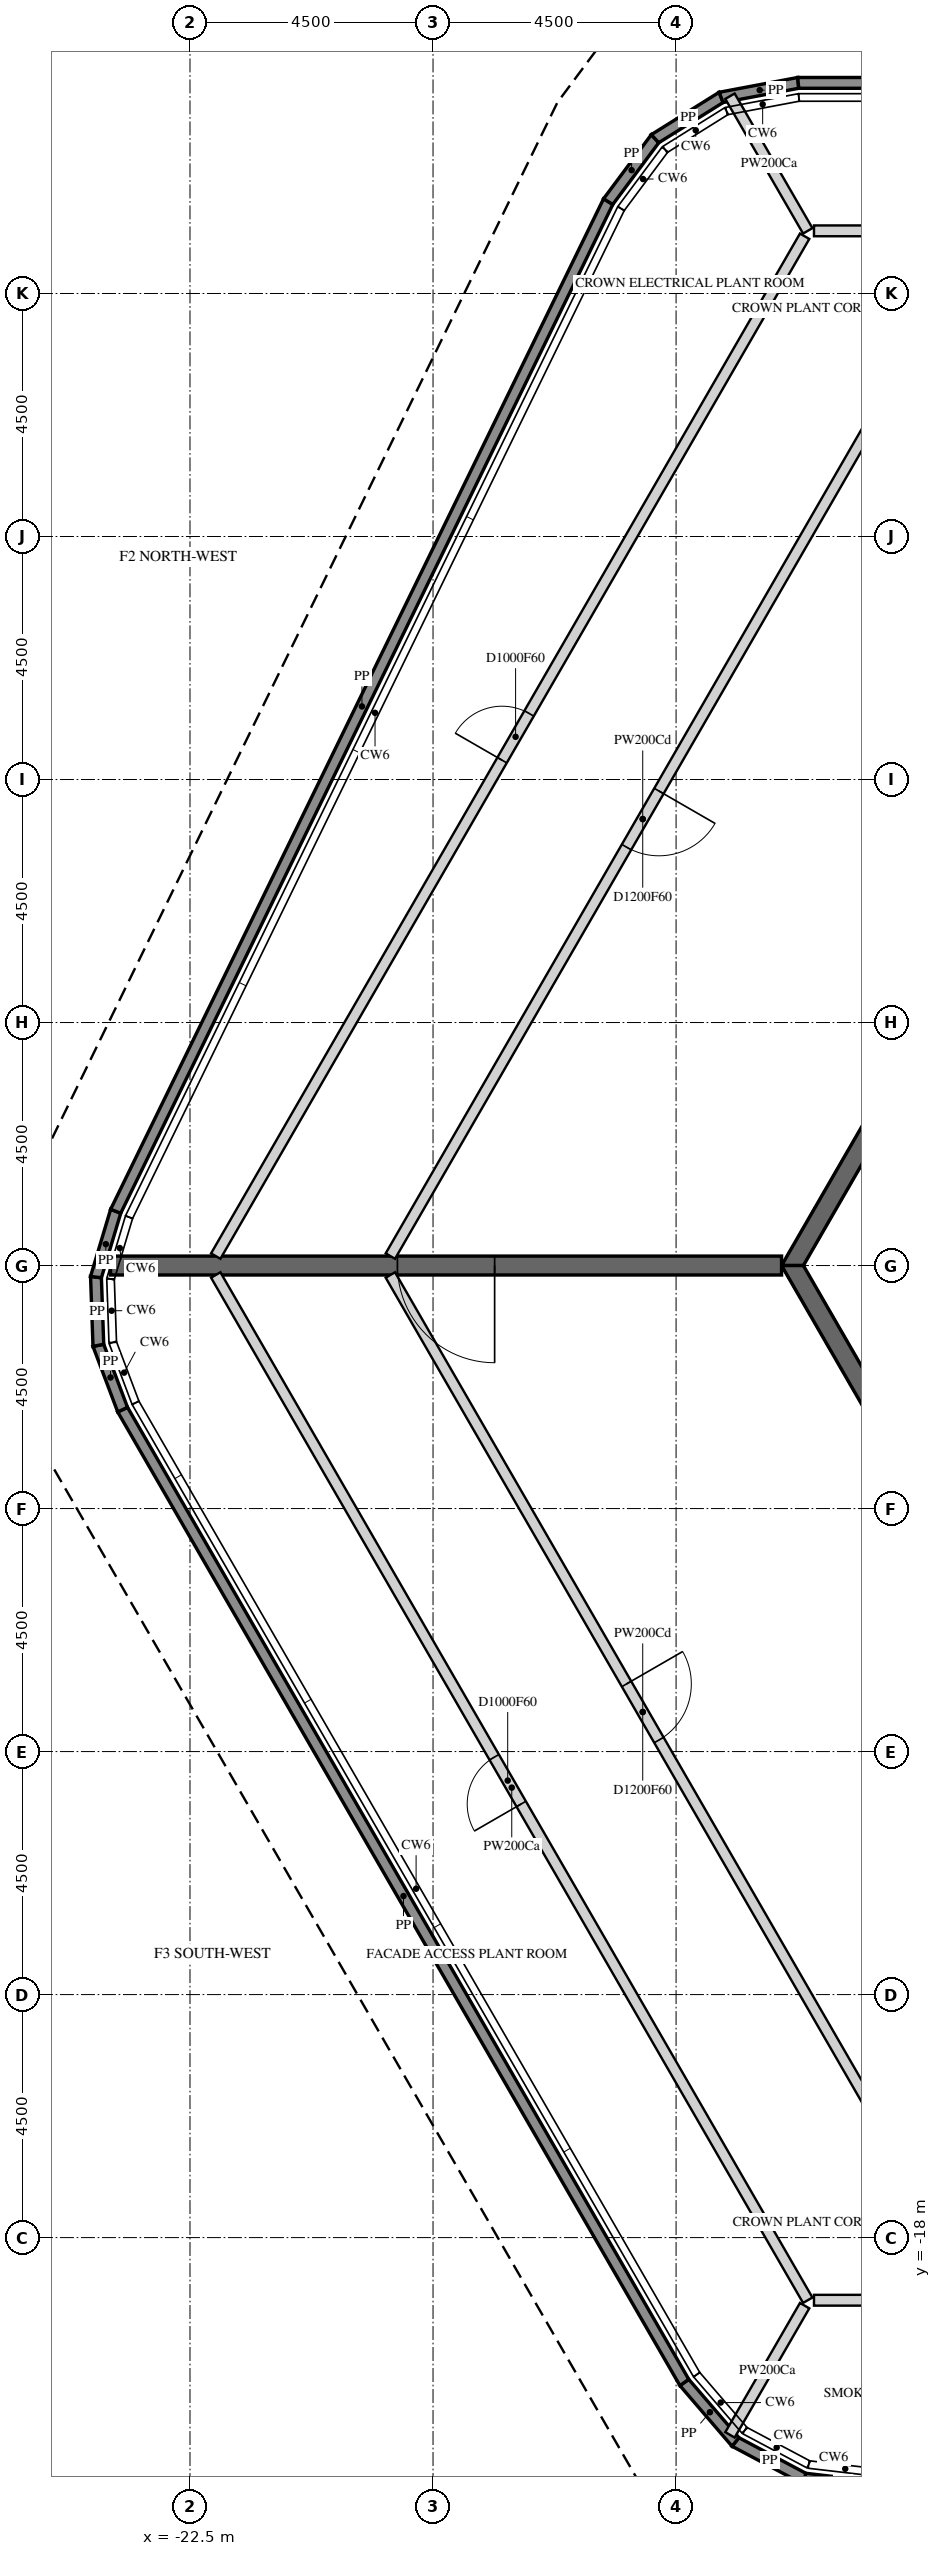
"""IFC4 building model, lengths in metres.
Left out: names, types, materials, properties, quantities, classifications, styles, units other than length and angle.
Written with IfcOpenShell. Run it as: python <this file> out.ifc"""

import sys

from ifc_helpers import new_model, si_unit, direction, frame, frame_2d, origin, place, context, subcontext, project, spatial, polyline, rectangle, outline, extrude, element, fill, save


model = new_model("IFC4")
c1 = context("Model", 3, precision=1e-05, world=origin(), true_north=direction((0.0, 1.0)))
c2 = subcontext(c1, "Body", "Model", "MODEL_VIEW")
j1 = project(units=[si_unit("LENGTHUNIT", "METRE"), si_unit("PLANEANGLEUNIT", "RADIAN")], contexts=[c1])
p1 = place(None, origin())
s1 = spatial("IfcSite", under=j1, at=p1, CompositionType="ELEMENT")
p2 = place(p1, origin())
s2 = spatial("IfcBuilding", under=s1, at=p2, CompositionType="ELEMENT")
p3 = place(p2, frame((0.0, 0.0, 388.2)))
s3 = spatial("IfcBuildingStorey", under=s2, at=p3, CompositionType="ELEMENT", Elevation=388.2)
p4 = place(p3, frame((-9.683, -22.631, 4.5), z_axis=(0.0, 0.0, 1.0), x_axis=(-0.993231825369, 0.116148788514, 0.0)))
e1 = element("IfcWall", 1, at=p4, inside=s3, PredefinedType="PARAPET", context=c2, shape_type="SweptSolid", body=[
    extrude(outline(polyline([(0.009, -0.1), (1.434, -0.1), (1.471, 0.1), (-0.009, 0.1), (0.009, -0.1)])), origin(), (0.0, 0.0, 1.0), 1.1),
])
p5 = place(p3, frame((-11.126, -22.462, 4.5), z_axis=(0.0, 0.0, 1.0), x_axis=(-0.882946998442, 0.46947268072, 0.0)))
e2 = element("IfcWall", 2, at=p5, inside=s3, PredefinedType="PARAPET", context=c2, shape_type="SweptSolid", body=[
    extrude(outline(polyline([(0.019, -0.1), (1.424, -0.1), (1.462, 0.1), (-0.019, 0.1), (0.019, -0.1)])), origin(), (0.0, 0.0, 1.0), 1.1),
])
p6 = place(p3, frame((-12.4, -21.784, 4.5), z_axis=(0.0, 0.0, 1.0), x_axis=(-0.651635311812, 0.758532412228, 0.0)))
e3 = element("IfcWall", 3, at=p6, inside=s3, PredefinedType="PARAPET", context=c2, shape_type="SweptSolid", body=[
    extrude(outline(polyline([(0.019, -0.1), (1.443, -0.1), (1.462, 0.1), (-0.019, 0.1), (0.019, -0.1)])), origin(), (0.0, 0.0, 1.0), 1.1),
])
p7 = place(p3, frame((-13.347, -20.683, 4.5), z_axis=(0.0, 0.0, 1.0), x_axis=(-0.500005572435, 0.866022186514, 0.0)))
e4 = element("IfcWall", 4, at=p7, inside=s3, PredefinedType="PARAPET", context=c2, shape_type="SweptSolid", body=[
    extrude(outline(polyline([(0.009, -0.1), (20.793, -0.1), (20.809, 0.1), (-0.009, 0.1), (0.009, -0.1)])), origin(), (0.0, 0.0, 1.0), 1.1),
])
p8 = place(p3, frame((-23.747, -2.668, 4.5), z_axis=(0.0, 0.0, 1.0), x_axis=(-0.352930531417, 0.935649528399, 0.0)))
e5 = element("IfcWall", 5, at=p8, inside=s3, PredefinedType="PARAPET", context=c2, shape_type="SweptSolid", body=[
    extrude(outline(polyline([(0.008, -0.1), (1.256, -0.1), (1.289, 0.1), (-0.008, 0.1), (0.008, -0.1)])), origin(), (0.0, 0.0, 1.0), 1.1),
])
p9 = place(p3, frame((-24.197, -1.478, 4.5), z_axis=(0.0, 0.0, 1.0), x_axis=(-0.034947726938, 0.999389141617, 0.0)))
e6 = element("IfcWall", 6, at=p9, inside=s3, PredefinedType="PARAPET", context=c2, shape_type="SweptSolid", body=[
    extrude(outline(polyline([(0.016, -0.1), (1.248, -0.1), (1.281, 0.1), (-0.016, 0.1), (0.016, -0.1)])), origin(), (0.0, 0.0, 1.0), 1.1),
])
p10 = place(p3, frame((-24.241, -0.214, 4.5), z_axis=(0.0, 0.0, 1.0), x_axis=(0.286907985053, 0.957958145282, 0.0)))
e7 = element("IfcWall", 7, at=p10, inside=s3, PredefinedType="PARAPET", context=c2, shape_type="SweptSolid", body=[
    extrude(outline(polyline([(0.016, -0.1), (1.265, -0.1), (1.281, 0.1), (-0.016, 0.1), (0.016, -0.1)])), origin(), (0.0, 0.0, 1.0), 1.1),
])
p11 = place(p3, frame((-23.875, 1.006, 4.5), z_axis=(0.0, 0.0, 1.0), x_axis=(0.43837021347, 0.898794501509, 0.0)))
e8 = element("IfcWall", 8, at=p11, inside=s3, PredefinedType="PARAPET", context=c2, shape_type="SweptSolid", body=[
    extrude(outline(polyline([(0.008, -0.1), (20.792, -0.1), (20.81, 0.1), (-0.008, 0.1), (0.008, -0.1)])), origin(), (0.0, 0.0, 1.0), 1.1),
])
p12 = place(p3, frame((-14.757, 19.701, 4.5), z_axis=(0.0, 0.0, 1.0), x_axis=(0.597118923952, 0.802152722777, 0.0)))
e9 = element("IfcWall", 9, at=p12, inside=s3, PredefinedType="PARAPET", context=c2, shape_type="SweptSolid", body=[
    extrude(outline(polyline([(0.009, -0.1), (1.434, -0.1), (1.471, 0.1), (-0.009, 0.1), (0.009, -0.1)])), origin(), (0.0, 0.0, 1.0), 1.1),
])
p13 = place(p3, frame((-13.89, 20.866, 4.5), z_axis=(0.0, 0.0, 1.0), x_axis=(0.848083831846, 0.529862070884, 0.0)))
e10 = element("IfcWall", 10, at=p13, inside=s3, PredefinedType="PARAPET", context=c2, shape_type="SweptSolid", body=[
    extrude(outline(polyline([(0.019, -0.1), (1.424, -0.1), (1.462, 0.1), (-0.019, 0.1), (0.019, -0.1)])), origin(), (0.0, 0.0, 1.0), 1.1),
])
p14 = place(p3, frame((-12.666, 21.631, 4.5), z_axis=(0.0, 0.0, 1.0), x_axis=(0.982729187844, 0.185049570005, 0.0)))
e11 = element("IfcWall", 11, at=p14, inside=s3, PredefinedType="PARAPET", context=c2, shape_type="SweptSolid", body=[
    extrude(outline(polyline([(0.019, -0.1), (1.443, -0.1), (1.462, 0.1), (-0.019, 0.1), (0.019, -0.1)])), origin(), (0.0, 0.0, 1.0), 1.1),
])
p15 = place(p3, frame((-11.238, 21.9, 4.5), z_axis=(0.0, 0.0, 1.0), x_axis=(1.0, 0.0, 0.0)))
e12 = element("IfcWall", 12, at=p15, inside=s3, PredefinedType="PARAPET", context=c2, shape_type="SweptSolid", body=[
    extrude(outline(polyline([(0.009, -0.1), (20.793, -0.1), (20.809, 0.1), (-0.009, 0.1), (0.009, -0.1)])), origin(), (0.0, 0.0, 1.0), 1.1),
])
p16 = place(p3, frame((-5.673, 9.825, -0.2), z_axis=(0.0, 0.0, 1.0), x_axis=(-0.499995046907, -0.866028263435, 0.0)))
e13 = element("IfcWall", 13, at=p16, inside=s3, PredefinedType="SHEAR", context=c2, shape_type="SweptSolid", body=[
    extrude(outline(polyline([(-0.101, -0.175), (11.446, -0.175), (11.244, 0.175), (0.101, 0.175), (-0.101, -0.175)])), origin(), (0.0, 0.0, 1.0), 4.5),
])
p17 = place(p16, frame((4.801, 0.0, 0.2)))
e14 = element("IfcOpeningElement", 14, at=p17, cuts=e13, PredefinedType="OPENING", context=c2, shape_type="SweptSolid", body=[
    extrude(rectangle(XDim=1.8, YDim=2.4, at=frame_2d((0.9, 1.2))), frame((0.0, 0.185, 0.0), z_axis=(0.0, -1.0, 0.0), x_axis=(1.0, 0.0, 0.0)), (0.0, 0.0, 1.0), 0.37),
])
p18 = place(p3, frame((-11.345, 0.0, -0.2), z_axis=(0.0, 0.0, 1.0), x_axis=(0.499995046907, -0.866028263435, 0.0)))
e15 = element("IfcWall", 15, at=p18, inside=s3, PredefinedType="SHEAR", context=c2, shape_type="SweptSolid", body=[
    extrude(outline(polyline([(-0.101, -0.175), (11.446, -0.175), (11.244, 0.175), (0.101, 0.175), (-0.101, -0.175)])), origin(), (0.0, 0.0, 1.0), 4.5),
])
p19 = place(p18, frame((4.744, 0.0, 0.2)))
e16 = element("IfcOpeningElement", 16, at=p19, cuts=e15, PredefinedType="OPENING", context=c2, shape_type="SweptSolid", body=[
    extrude(rectangle(XDim=1.8, YDim=2.4, at=frame_2d((0.9, 1.2))), frame((0.0, 0.185, 0.0), z_axis=(0.0, -1.0, 0.0), x_axis=(1.0, 0.0, 0.0)), (0.0, 0.0, 1.0), 0.37),
])
p20 = place(p3, frame((-11.547, 0.0, -0.2), z_axis=(0.0, 0.0, 1.0), x_axis=(-1.0, 0.0, 0.0)))
e17 = element("IfcWall", 17, at=p20, inside=s3, PredefinedType="SHEAR", context=c2, shape_type="SweptSolid", body=[
    extrude(rectangle(XDim=12.425, YDim=0.35, at=frame_2d((6.212, 0.0))), origin(), (0.0, 0.0, 1.0), 4.5),
])
p21 = place(p20, frame((5.312, 0.0, 0.2)))
e18 = element("IfcOpeningElement", 18, at=p21, cuts=e17, PredefinedType="OPENING", context=c2, shape_type="SweptSolid", body=[
    extrude(rectangle(XDim=1.8, YDim=2.4, at=frame_2d((0.9, 1.2))), frame((0.0, 0.185, 0.0), z_axis=(0.0, -1.0, 0.0), x_axis=(1.0, 0.0, 0.0)), (0.0, 0.0, 1.0), 0.37),
])
p22 = place(p3, frame((-11.062, -19.16, 0.0), z_axis=(0.0, 0.0, 1.0), x_axis=(-0.500000738101, 0.866024977641, 0.0)))
e19 = element("IfcWall", 19, at=p22, inside=s3, PredefinedType="PARTITIONING", context=c2, shape_type="SweptSolid", body=[
    extrude(rectangle(XDim=21.922, YDim=0.2, at=frame_2d((10.961, 0.0))), origin(), (0.0, 0.0, 1.0), 4.3),
])
p23 = place(p22, frame((10.611, 0.0, 0.0)))
e20 = element("IfcOpeningElement", 20, at=p23, cuts=e19, PredefinedType="OPENING", context=c2, shape_type="SweptSolid", body=[
    extrude(rectangle(XDim=1.0, YDim=2.1, at=frame_2d((0.5, 1.05))), frame((0.0, 0.11, 0.0), z_axis=(0.0, -1.0, 0.0), x_axis=(1.0, 0.0, 0.0)), (0.0, 0.0, 1.0), 0.22),
])
p24 = place(p3, frame((-18.79, -0.175, 0.0), z_axis=(0.0, 0.0, 1.0), x_axis=(0.500020978615, -0.866013291437, 0.0)))
e21 = element("IfcWall", 21, at=p24, inside=s3, PredefinedType="PARTITIONING", context=c2, shape_type="SweptSolid", body=[
    extrude(rectangle(XDim=18.689, YDim=0.2, at=frame_2d((9.345, 0.0))), origin(), (0.0, 0.0, 1.0), 3.692),
])
p25 = place(p24, frame((8.745, 0.0, 0.0)))
e22 = element("IfcOpeningElement", 22, at=p25, cuts=e21, PredefinedType="OPENING", context=c2, shape_type="SweptSolid", body=[
    extrude(rectangle(XDim=1.2, YDim=2.1, at=frame_2d((0.6, 1.05))), frame((0.0, 0.11, 0.0), z_axis=(0.0, -1.0, 0.0), x_axis=(1.0, 0.0, 0.0)), (0.0, 0.0, 1.0), 0.22),
])
p26 = place(p3, frame((-12.502, -21.653, 0.0), z_axis=(0.0, 0.0, 1.0), x_axis=(0.500186343266, 0.865917791716, 0.0)))
e23 = element("IfcWall", 23, at=p26, inside=s3, PredefinedType="PARTITIONING", context=c2, shape_type="SweptSolid", body=[
    extrude(rectangle(XDim=2.764, YDim=0.2, at=frame_2d((1.382, 0.0))), origin(), (0.0, 0.0, 1.0), 4.3),
])
p27 = place(p3, frame((-12.502, 21.653, 0.0), z_axis=(0.0, 0.0, 1.0), x_axis=(0.500133489192, -0.865948320045, 0.0)))
e24 = element("IfcWall", 24, at=p27, inside=s3, PredefinedType="PARTITIONING", context=c2, shape_type="SweptSolid", body=[
    extrude(rectangle(XDim=2.879, YDim=0.2, at=frame_2d((1.439, 0.0))), origin(), (0.0, 0.0, 1.0), 4.3),
])
p28 = place(p3, frame((10.86, -19.16, 0.0), z_axis=(0.0, 0.0, 1.0), x_axis=(-1.0, 0.0, 0.0)))
e25 = element("IfcWall", 25, at=p28, inside=s3, PredefinedType="PARTITIONING", context=c2, shape_type="SweptSolid", body=[
    extrude(rectangle(XDim=21.807, YDim=0.2, at=frame_2d((10.903, 0.0))), origin(), (0.0, 0.0, 1.0), 4.3),
])
p29 = place(p28, frame((10.603, 0.0, 0.0)))
e26 = element("IfcOpeningElement", 26, at=p29, cuts=e25, PredefinedType="OPENING", context=c2, shape_type="SweptSolid", body=[
    extrude(rectangle(XDim=1.0, YDim=2.1, at=frame_2d((0.5, 1.05))), frame((0.0, 0.11, 0.0), z_axis=(0.0, -1.0, 0.0), x_axis=(1.0, 0.0, 0.0)), (0.0, 0.0, 1.0), 0.22),
])
p30 = place(p3, frame((-22.023, 0.175, 0.0), z_axis=(0.0, 0.0, 1.0), x_axis=(0.500001886152, 0.866024314812, 0.0)))
e27 = element("IfcWall", 27, at=p30, inside=s3, PredefinedType="PARTITIONING", context=c2, shape_type="SweptSolid", body=[
    extrude(rectangle(XDim=21.807, YDim=0.2, at=frame_2d((10.903, 0.0))), origin(), (0.0, 0.0, 1.0), 4.3),
])
p31 = place(p30, frame((10.603, 0.0, 0.0)))
e28 = element("IfcOpeningElement", 28, at=p31, cuts=e27, PredefinedType="OPENING", context=c2, shape_type="SweptSolid", body=[
    extrude(rectangle(XDim=1.0, YDim=2.1, at=frame_2d((0.5, 1.05))), frame((0.0, 0.11, 0.0), z_axis=(0.0, -1.0, 0.0), x_axis=(1.0, 0.0, 0.0)), (0.0, 0.0, 1.0), 0.22),
])
p32 = place(p3, frame((-9.445, 16.36, 0.0), z_axis=(0.0, 0.0, 1.0), x_axis=(-0.500020978615, -0.866013291437, 0.0)))
e29 = element("IfcWall", 29, at=p32, inside=s3, PredefinedType="PARTITIONING", context=c2, shape_type="SweptSolid", body=[
    extrude(rectangle(XDim=18.689, YDim=0.2, at=frame_2d((9.345, 0.0))), origin(), (0.0, 0.0, 1.0), 3.692),
])
p33 = place(p32, frame((8.745, 0.0, 0.0)))
e30 = element("IfcOpeningElement", 30, at=p33, cuts=e29, PredefinedType="OPENING", context=c2, shape_type="SweptSolid", body=[
    extrude(rectangle(XDim=1.2, YDim=2.1, at=frame_2d((0.6, 1.05))), frame((0.0, 0.11, 0.0), z_axis=(0.0, -1.0, 0.0), x_axis=(1.0, 0.0, 0.0)), (0.0, 0.0, 1.0), 0.22),
])
p34 = place(p3, frame((-10.947, 19.16, 0.0), z_axis=(0.0, 0.0, 1.0), x_axis=(1.0, 0.0, 0.0)))
e31 = element("IfcWall", 31, at=p34, inside=s3, PredefinedType="PARTITIONING", context=c2, shape_type="SweptSolid", body=[
    extrude(rectangle(XDim=21.807, YDim=0.2, at=frame_2d((10.903, 0.0))), origin(), (0.0, 0.0, 1.0), 4.3),
])
p35 = place(p34, frame((10.503, 0.0, 0.0)))
e32 = element("IfcOpeningElement", 32, at=p35, cuts=e31, PredefinedType="OPENING", context=c2, shape_type="SweptSolid", body=[
    extrude(rectangle(XDim=1.0, YDim=2.1, at=frame_2d((0.5, 1.05))), frame((0.0, 0.11, 0.0), z_axis=(0.0, -1.0, 0.0), x_axis=(1.0, 0.0, 0.0)), (0.0, 0.0, 1.0), 0.22),
])
p36 = place(p21, origin())
e33 = element("IfcDoor", 33, at=p36, inside=s3, OperationType="DOUBLE_DOOR_SINGLE_SWING", PredefinedType="DOOR", context=c2, shape_type="SweptSolid", body=[
    extrude(rectangle(XDim=1.8, YDim=2.4, at=frame_2d((0.9, 1.2))), frame((0.0, 0.025, 0.0), z_axis=(0.0, -1.0, 0.0), x_axis=(1.0, 0.0, 0.0)), (0.0, 0.0, 1.0), 0.05),
])
fill(e18, e33)
p37 = place(p23, origin())
e34 = element("IfcDoor", 34, at=p37, inside=s3, OperationType="SINGLE_SWING_RIGHT", PredefinedType="DOOR", context=c2, shape_type="SweptSolid", body=[
    extrude(rectangle(XDim=1.0, YDim=2.1, at=frame_2d((0.5, 1.05))), frame((0.0, 0.025, 0.0), z_axis=(0.0, -1.0, 0.0), x_axis=(1.0, 0.0, 0.0)), (0.0, 0.0, 1.0), 0.05),
])
fill(e20, e34)
p38 = place(p25, origin())
e35 = element("IfcDoor", 35, at=p38, inside=s3, OperationType="SINGLE_SWING_LEFT", PredefinedType="DOOR", context=c2, shape_type="SweptSolid", body=[
    extrude(rectangle(XDim=1.2, YDim=2.1, at=frame_2d((0.6, 1.05))), frame((0.0, 0.025, 0.0), z_axis=(0.0, -1.0, 0.0), x_axis=(1.0, 0.0, 0.0)), (0.0, 0.0, 1.0), 0.05),
])
fill(e22, e35)
p39 = place(p31, origin())
e36 = element("IfcDoor", 36, at=p39, inside=s3, OperationType="SINGLE_SWING_LEFT", PredefinedType="DOOR", context=c2, shape_type="SweptSolid", body=[
    extrude(rectangle(XDim=1.0, YDim=2.1, at=frame_2d((0.5, 1.05))), frame((0.0, 0.025, 0.0), z_axis=(0.0, -1.0, 0.0), x_axis=(1.0, 0.0, 0.0)), (0.0, 0.0, 1.0), 0.05),
])
fill(e28, e36)
p40 = place(p33, origin())
e37 = element("IfcDoor", 37, at=p40, inside=s3, OperationType="SINGLE_SWING_RIGHT", PredefinedType="DOOR", context=c2, shape_type="SweptSolid", body=[
    extrude(rectangle(XDim=1.2, YDim=2.1, at=frame_2d((0.6, 1.05))), frame((0.0, 0.025, 0.0), z_axis=(0.0, -1.0, 0.0), x_axis=(1.0, 0.0, 0.0)), (0.0, 0.0, 1.0), 0.05),
])
fill(e30, e37)
save(model, sys.argv[1])
